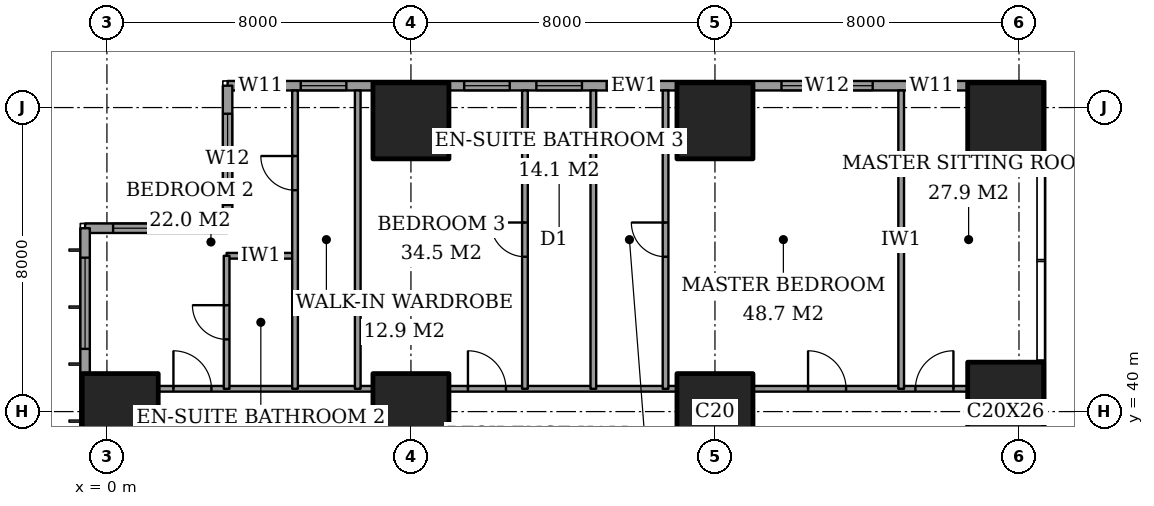
"""IFC4 building model, lengths in metres.
Left out: names, types, materials, properties, quantities, classifications, styles, units other than length and angle.
Written with IfcOpenShell. Run it as: python <this file> out.ifc"""

import sys

from ifc_helpers import new_model, si_unit, direction, frame, frame_2d, origin, origin_2d, place, context, subcontext, project, spatial, rectangle, extrude, element, fill, save


model = new_model("IFC4")
c1 = context("Model", 3, precision=1e-05, world=origin(), true_north=direction((0.0, 1.0)))
c2 = subcontext(c1, "Body", "Model", "MODEL_VIEW")
j1 = project(units=[si_unit("LENGTHUNIT", "METRE"), si_unit("PLANEANGLEUNIT", "RADIAN")], contexts=[c1])
p1 = place(None, origin())
s1 = spatial("IfcSite", under=j1, at=p1, CompositionType="ELEMENT")
p2 = place(p1, origin())
s2 = spatial("IfcBuilding", under=s1, at=p2, CompositionType="ELEMENT")
p3 = place(p2, frame((0.0, 0.0, 117.8)))
s3 = spatial("IfcBuildingStorey", under=s2, at=p3, CompositionType="ELEMENT", Elevation=117.8)
for number, where, z_axis, x_axis in (
    (1, (0.35, 40.0, 0.0), (0.0, 0.0, 1.0), (1.0, 0.0, 0.0)),
    (2, (8.0, 40.0, 0.0), (0.0, 0.0, 1.0), (1.0, 0.0, 0.0)),
    (3, (8.0, 47.65, 0.0), (0.0, 0.0, 1.0), (1.0, 0.0, 0.0)),
    (4, (16.0, 40.0, 0.0), (0.0, 0.0, 1.0), (1.0, 0.0, 0.0)),
    (5, (16.0, 47.65, 0.0), (0.0, 0.0, 1.0), (1.0, 0.0, 0.0)),
):
    element("IfcColumn", number, at=place(p3, frame(where, z_axis=z_axis, x_axis=x_axis)), inside=s3, PredefinedType="COLUMN", context=c2, shape_type="SweptSolid", body=[
        extrude(rectangle(XDim=2.0, YDim=2.0, at=origin_2d()), origin(), (0.0, 0.0, 1.0), 3.6),
    ])
p4 = place(p3, frame((23.65, 40.0, 0.0), z_axis=(0.0, 0.0, 1.0), x_axis=(1.0, 0.0, 0.0)))
e6 = element("IfcColumn", 6, at=p4, inside=s3, PredefinedType="COLUMN", context=c2, shape_type="SweptSolid", body=[
    extrude(rectangle(XDim=2.0, YDim=2.6, at=origin_2d()), origin(), (0.0, 0.0, 1.0), 3.6),
])
p5 = place(p3, frame((23.65, 47.65, 0.0), z_axis=(0.0, 0.0, 1.0), x_axis=(1.0, 0.0, 0.0)))
e7 = element("IfcColumn", 7, at=p5, inside=s3, PredefinedType="COLUMN", context=c2, shape_type="SweptSolid", body=[
    extrude(rectangle(XDim=2.0, YDim=2.0, at=origin_2d()), origin(), (0.0, 0.0, 1.0), 3.6),
])
p6 = place(p3, frame((24.575, 48.575, 0.0), z_axis=(0.0, 0.0, 1.0), x_axis=(-1.0, 0.0, 0.0)))
e8 = element("IfcWall", 8, at=p6, inside=s3, PredefinedType="SOLIDWALL", context=c2, shape_type="SweptSolid", body=[
    extrude(rectangle(XDim=21.4, YDim=0.25, at=frame_2d((10.7, 0.0))), origin(), (0.0, 0.0, 1.0), 3.6),
])
p7 = place(p6, frame((2.275, 0.0, 0.4)))
e9 = element("IfcOpeningElement", 9, at=p7, cuts=e8, PredefinedType="OPENING", context=c2, shape_type="SweptSolid", body=[
    extrude(rectangle(XDim=1.2, YDim=2.2, at=frame_2d((0.6, 1.1))), frame((0.0, 0.135, 0.0), z_axis=(0.0, -1.0, 0.0), x_axis=(1.0, 0.0, 0.0)), (0.0, 0.0, 1.0), 0.27),
])
p8 = place(p6, frame((4.425, 0.0, 0.4)))
e10 = element("IfcOpeningElement", 10, at=p8, cuts=e8, PredefinedType="OPENING", context=c2, shape_type="SweptSolid", body=[
    extrude(rectangle(XDim=2.4, YDim=2.2, at=frame_2d((1.2, 1.1))), frame((0.0, 0.135, 0.0), z_axis=(0.0, -1.0, 0.0), x_axis=(1.0, 0.0, 0.0)), (0.0, 0.0, 1.0), 0.27),
])
p9 = place(p6, frame((10.225, 0.0, 0.4)))
e11 = element("IfcOpeningElement", 11, at=p9, cuts=e8, PredefinedType="OPENING", context=c2, shape_type="SweptSolid", body=[
    extrude(rectangle(XDim=1.2, YDim=2.2, at=frame_2d((0.6, 1.1))), frame((0.0, 0.135, 0.0), z_axis=(0.0, -1.0, 0.0), x_axis=(1.0, 0.0, 0.0)), (0.0, 0.0, 1.0), 0.27),
])
p10 = place(p6, frame((12.075, 0.0, 0.4)))
e12 = element("IfcOpeningElement", 12, at=p10, cuts=e8, PredefinedType="OPENING", context=c2, shape_type="SweptSolid", body=[
    extrude(rectangle(XDim=1.2, YDim=2.2, at=frame_2d((0.6, 1.1))), frame((0.0, 0.135, 0.0), z_axis=(0.0, -1.0, 0.0), x_axis=(1.0, 0.0, 0.0)), (0.0, 0.0, 1.0), 0.27),
])
p11 = place(p6, frame((13.975, 0.0, 0.4)))
e13 = element("IfcOpeningElement", 13, at=p11, cuts=e8, PredefinedType="OPENING", context=c2, shape_type="SweptSolid", body=[
    extrude(rectangle(XDim=1.2, YDim=2.2, at=frame_2d((0.6, 1.1))), frame((0.0, 0.135, 0.0), z_axis=(0.0, -1.0, 0.0), x_axis=(1.0, 0.0, 0.0)), (0.0, 0.0, 1.0), 0.27),
])
p12 = place(p6, frame((18.275, 0.0, 0.4)))
e14 = element("IfcOpeningElement", 14, at=p12, cuts=e8, PredefinedType="OPENING", context=c2, shape_type="SweptSolid", body=[
    extrude(rectangle(XDim=1.2, YDim=2.2, at=frame_2d((0.6, 1.1))), frame((0.0, 0.135, 0.0), z_axis=(0.0, -1.0, 0.0), x_axis=(1.0, 0.0, 0.0)), (0.0, 0.0, 1.0), 0.27),
])
p13 = place(p6, frame((19.925, 0.0, 0.4)))
e15 = element("IfcOpeningElement", 15, at=p13, cuts=e8, PredefinedType="OPENING", context=c2, shape_type="SweptSolid", body=[
    extrude(rectangle(XDim=1.2, YDim=2.2, at=frame_2d((0.6, 1.1))), frame((0.0, 0.135, 0.0), z_axis=(0.0, -1.0, 0.0), x_axis=(1.0, 0.0, 0.0)), (0.0, 0.0, 1.0), 0.27),
])
p14 = place(p3, frame((3.175, 48.575, 0.0), z_axis=(0.0, 0.0, 1.0), x_axis=(0.0, -1.0, 0.0)))
e16 = element("IfcWall", 16, at=p14, inside=s3, PredefinedType="SOLIDWALL", context=c2, shape_type="SweptSolid", body=[
    extrude(rectangle(XDim=3.75, YDim=0.25, at=frame_2d((1.875, 0.0))), origin(), (0.0, 0.0, 1.0), 3.6),
])
p15 = place(p14, frame((0.738, 0.0, 0.4)))
e17 = element("IfcOpeningElement", 17, at=p15, cuts=e16, PredefinedType="OPENING", context=c2, shape_type="SweptSolid", body=[
    extrude(rectangle(XDim=2.4, YDim=2.2, at=frame_2d((1.2, 1.1))), frame((0.0, 0.135, 0.0), z_axis=(0.0, -1.0, 0.0), x_axis=(1.0, 0.0, 0.0)), (0.0, 0.0, 1.0), 0.27),
])
p16 = place(p3, frame((3.175, 44.825, 0.0), z_axis=(0.0, 0.0, 1.0), x_axis=(-1.0, 0.0, 0.0)))
e18 = element("IfcWall", 18, at=p16, inside=s3, PredefinedType="SOLIDWALL", context=c2, shape_type="SweptSolid", body=[
    extrude(rectangle(XDim=3.75, YDim=0.25, at=frame_2d((1.875, 0.0))), origin(), (0.0, 0.0, 1.0), 3.6),
])
p17 = place(p16, frame((0.613, 0.0, 0.4)))
e19 = element("IfcOpeningElement", 19, at=p17, cuts=e18, PredefinedType="OPENING", context=c2, shape_type="SweptSolid", body=[
    extrude(rectangle(XDim=2.4, YDim=2.2, at=frame_2d((1.2, 1.1))), frame((0.0, 0.135, 0.0), z_axis=(0.0, -1.0, 0.0), x_axis=(1.0, 0.0, 0.0)), (0.0, 0.0, 1.0), 0.27),
])
p18 = place(p3, frame((-0.575, 44.825, 0.0), z_axis=(0.0, 0.0, 1.0), x_axis=(0.0, -1.0, 0.0)))
e20 = element("IfcWall", 20, at=p18, inside=s3, PredefinedType="SOLIDWALL", context=c2, shape_type="SweptSolid", body=[
    extrude(rectangle(XDim=41.65, YDim=0.25, at=frame_2d((20.825, 0.0))), origin(), (0.0, 0.0, 1.0), 3.6),
])
p19 = place(p18, frame((0.775, 0.0, 0.4)))
e21 = element("IfcOpeningElement", 21, at=p19, cuts=e20, PredefinedType="OPENING", context=c2, shape_type="SweptSolid", body=[
    extrude(rectangle(XDim=2.4, YDim=2.2, at=frame_2d((1.2, 1.1))), frame((0.0, 0.135, 0.0), z_axis=(0.0, -1.0, 0.0), x_axis=(1.0, 0.0, 0.0)), (0.0, 0.0, 1.0), 0.27),
])
p20 = place(p18, frame((6.1, 0.0, 0.4)))
e22 = element("IfcOpeningElement", 22, at=p20, cuts=e20, PredefinedType="OPENING", context=c2, shape_type="SweptSolid", body=[
    extrude(rectangle(XDim=1.2, YDim=2.2, at=frame_2d((0.6, 1.1))), frame((0.0, 0.135, 0.0), z_axis=(0.0, -1.0, 0.0), x_axis=(1.0, 0.0, 0.0)), (0.0, 0.0, 1.0), 0.27),
])
p21 = place(p18, frame((8.225, 0.0, 0.4)))
e23 = element("IfcOpeningElement", 23, at=p21, cuts=e20, PredefinedType="OPENING", context=c2, shape_type="SweptSolid", body=[
    extrude(rectangle(XDim=2.4, YDim=2.2, at=frame_2d((1.2, 1.1))), frame((0.0, 0.135, 0.0), z_axis=(0.0, -1.0, 0.0), x_axis=(1.0, 0.0, 0.0)), (0.0, 0.0, 1.0), 0.27),
])
p22 = place(p18, frame((15.625, 0.0, 0.4)))
e24 = element("IfcOpeningElement", 24, at=p22, cuts=e20, PredefinedType="OPENING", context=c2, shape_type="SweptSolid", body=[
    extrude(rectangle(XDim=2.4, YDim=2.2, at=frame_2d((1.2, 1.1))), frame((0.0, 0.135, 0.0), z_axis=(0.0, -1.0, 0.0), x_axis=(1.0, 0.0, 0.0)), (0.0, 0.0, 1.0), 0.27),
])
p23 = place(p18, frame((23.625, 0.0, 0.4)))
e25 = element("IfcOpeningElement", 25, at=p23, cuts=e20, PredefinedType="OPENING", context=c2, shape_type="SweptSolid", body=[
    extrude(rectangle(XDim=2.4, YDim=2.2, at=frame_2d((1.2, 1.1))), frame((0.0, 0.135, 0.0), z_axis=(0.0, -1.0, 0.0), x_axis=(1.0, 0.0, 0.0)), (0.0, 0.0, 1.0), 0.27),
])
p24 = place(p18, frame((30.825, 0.0, 0.4)))
e26 = element("IfcOpeningElement", 26, at=p24, cuts=e20, PredefinedType="OPENING", context=c2, shape_type="SweptSolid", body=[
    extrude(rectangle(XDim=2.4, YDim=2.2, at=frame_2d((1.2, 1.1))), frame((0.0, 0.135, 0.0), z_axis=(0.0, -1.0, 0.0), x_axis=(1.0, 0.0, 0.0)), (0.0, 0.0, 1.0), 0.27),
])
p25 = place(p18, frame((34.5, 0.0, 0.4)))
e27 = element("IfcOpeningElement", 27, at=p25, cuts=e20, PredefinedType="OPENING", context=c2, shape_type="SweptSolid", body=[
    extrude(rectangle(XDim=1.2, YDim=2.2, at=frame_2d((0.6, 1.1))), frame((0.0, 0.135, 0.0), z_axis=(0.0, -1.0, 0.0), x_axis=(1.0, 0.0, 0.0)), (0.0, 0.0, 1.0), 0.27),
])
p26 = place(p18, frame((38.475, 0.0, 0.4)))
e28 = element("IfcOpeningElement", 28, at=p26, cuts=e20, PredefinedType="OPENING", context=c2, shape_type="SweptSolid", body=[
    extrude(rectangle(XDim=2.4, YDim=2.2, at=frame_2d((1.2, 1.1))), frame((0.0, 0.135, 0.0), z_axis=(0.0, -1.0, 0.0), x_axis=(1.0, 0.0, 0.0)), (0.0, 0.0, 1.0), 0.27),
])
p27 = place(p3, frame((1.35, 40.6, 0.0), z_axis=(0.0, 0.0, 1.0), x_axis=(1.0, 0.0, 0.0)))
e29 = element("IfcWall", 29, at=p27, inside=s3, PredefinedType="PARTITIONING", context=c2, shape_type="SweptSolid", body=[
    extrude(rectangle(XDim=5.65, YDim=0.15, at=frame_2d((2.825, 0.0))), origin(), (0.0, 0.0, 1.0), 3.35),
])
p28 = place(p27, frame((0.4, 0.0, 0.0)))
e30 = element("IfcOpeningElement", 30, at=p28, cuts=e29, PredefinedType="OPENING", context=c2, shape_type="SweptSolid", body=[
    extrude(rectangle(XDim=1.0, YDim=2.1, at=frame_2d((0.5, 1.05))), frame((0.0, 0.085, 0.0), z_axis=(0.0, -1.0, 0.0), x_axis=(1.0, 0.0, 0.0)), (0.0, 0.0, 1.0), 0.17),
])
p29 = place(p3, frame((9.0, 40.6, 0.0), z_axis=(0.0, 0.0, 1.0), x_axis=(1.0, 0.0, 0.0)))
e31 = element("IfcWall", 31, at=p29, inside=s3, PredefinedType="PARTITIONING", context=c2, shape_type="SweptSolid", body=[
    extrude(rectangle(XDim=6.0, YDim=0.15, at=frame_2d((3.0, 0.0))), origin(), (0.0, 0.0, 1.0), 3.35),
])
p30 = place(p29, frame((0.5, 0.0, 0.0)))
e32 = element("IfcOpeningElement", 32, at=p30, cuts=e31, PredefinedType="OPENING", context=c2, shape_type="SweptSolid", body=[
    extrude(rectangle(XDim=1.0, YDim=2.1, at=frame_2d((0.5, 1.05))), frame((0.0, 0.085, 0.0), z_axis=(0.0, -1.0, 0.0), x_axis=(1.0, 0.0, 0.0)), (0.0, 0.0, 1.0), 0.17),
])
p31 = place(p3, frame((17.0, 40.6, 0.0), z_axis=(0.0, 0.0, 1.0), x_axis=(1.0, 0.0, 0.0)))
e33 = element("IfcWall", 33, at=p31, inside=s3, PredefinedType="PARTITIONING", context=c2, shape_type="SweptSolid", body=[
    extrude(rectangle(XDim=5.65, YDim=0.15, at=frame_2d((2.825, 0.0))), origin(), (0.0, 0.0, 1.0), 3.35),
])
p32 = place(p31, frame((1.45, 0.0, 0.0)))
e34 = element("IfcOpeningElement", 34, at=p32, cuts=e33, PredefinedType="OPENING", context=c2, shape_type="SweptSolid", body=[
    extrude(rectangle(XDim=1.0, YDim=2.1, at=frame_2d((0.5, 1.05))), frame((0.0, 0.085, 0.0), z_axis=(0.0, -1.0, 0.0), x_axis=(1.0, 0.0, 0.0)), (0.0, 0.0, 1.0), 0.17),
])
p33 = place(p31, frame((4.275, 0.0, 0.0)))
e35 = element("IfcOpeningElement", 35, at=p33, cuts=e33, PredefinedType="OPENING", context=c2, shape_type="SweptSolid", body=[
    extrude(rectangle(XDim=1.0, YDim=2.1, at=frame_2d((0.5, 1.05))), frame((0.0, 0.085, 0.0), z_axis=(0.0, -1.0, 0.0), x_axis=(1.0, 0.0, 0.0)), (0.0, 0.0, 1.0), 0.17),
])
p34 = place(p3, frame((3.15, 44.1, 0.0), z_axis=(0.0, 0.0, 1.0), x_axis=(1.0, 0.0, 0.0)))
e36 = element("IfcWall", 36, at=p34, inside=s3, PredefinedType="PARTITIONING", context=c2, shape_type="SweptSolid", body=[
    extrude(rectangle(XDim=1.8, YDim=0.15, at=frame_2d((0.9, 0.0))), origin(), (0.0, 0.0, 1.0), 3.35),
])
p35 = place(p3, frame((3.15, 40.6, 0.0), z_axis=(0.0, 0.0, 1.0), x_axis=(0.0, 1.0, 0.0)))
e37 = element("IfcWall", 37, at=p35, inside=s3, PredefinedType="PARTITIONING", context=c2, shape_type="SweptSolid", body=[
    extrude(rectangle(XDim=3.5, YDim=0.15, at=frame_2d((1.75, 0.0))), origin(), (0.0, 0.0, 1.0), 3.35),
])
p36 = place(p35, frame((1.3, 0.0, 0.0)))
e38 = element("IfcOpeningElement", 38, at=p36, cuts=e37, PredefinedType="OPENING", context=c2, shape_type="SweptSolid", body=[
    extrude(rectangle(XDim=0.9, YDim=2.1, at=frame_2d((0.45, 1.05))), frame((0.0, 0.085, 0.0), z_axis=(0.0, -1.0, 0.0), x_axis=(1.0, 0.0, 0.0)), (0.0, 0.0, 1.0), 0.17),
])
p37 = place(p3, frame((4.95, 40.6, 0.0), z_axis=(0.0, 0.0, 1.0), x_axis=(0.0, 1.0, 0.0)))
e39 = element("IfcWall", 39, at=p37, inside=s3, PredefinedType="PARTITIONING", context=c2, shape_type="SweptSolid", body=[
    extrude(rectangle(XDim=7.85, YDim=0.15, at=frame_2d((3.925, 0.0))), origin(), (0.0, 0.0, 1.0), 3.35),
])
p38 = place(p37, frame((5.225, 0.0, 0.0)))
e40 = element("IfcOpeningElement", 40, at=p38, cuts=e39, PredefinedType="OPENING", context=c2, shape_type="SweptSolid", body=[
    extrude(rectangle(XDim=0.9, YDim=2.1, at=frame_2d((0.45, 1.05))), frame((0.0, 0.085, 0.0), z_axis=(0.0, -1.0, 0.0), x_axis=(1.0, 0.0, 0.0)), (0.0, 0.0, 1.0), 0.17),
])
p39 = place(p3, frame((6.6, 40.6, 0.0), z_axis=(0.0, 0.0, 1.0), x_axis=(0.0, 1.0, 0.0)))
e41 = element("IfcWall", 41, at=p39, inside=s3, PredefinedType="PARTITIONING", context=c2, shape_type="SweptSolid", body=[
    extrude(rectangle(XDim=7.85, YDim=0.15, at=frame_2d((3.925, 0.0))), origin(), (0.0, 0.0, 1.0), 3.35),
])
p40 = place(p3, frame((11.0, 40.6, 0.0), z_axis=(0.0, 0.0, 1.0), x_axis=(0.0, 1.0, 0.0)))
e42 = element("IfcWall", 42, at=p40, inside=s3, PredefinedType="PARTITIONING", context=c2, shape_type="SweptSolid", body=[
    extrude(rectangle(XDim=7.85, YDim=0.15, at=frame_2d((3.925, 0.0))), origin(), (0.0, 0.0, 1.0), 3.35),
])
p41 = place(p40, frame((3.475, 0.0, 0.0)))
e43 = element("IfcOpeningElement", 43, at=p41, cuts=e42, PredefinedType="OPENING", context=c2, shape_type="SweptSolid", body=[
    extrude(rectangle(XDim=0.9, YDim=2.1, at=frame_2d((0.45, 1.05))), frame((0.0, 0.085, 0.0), z_axis=(0.0, -1.0, 0.0), x_axis=(1.0, 0.0, 0.0)), (0.0, 0.0, 1.0), 0.17),
])
p42 = place(p3, frame((12.8, 40.6, 0.0), z_axis=(0.0, 0.0, 1.0), x_axis=(0.0, 1.0, 0.0)))
e44 = element("IfcWall", 44, at=p42, inside=s3, PredefinedType="PARTITIONING", context=c2, shape_type="SweptSolid", body=[
    extrude(rectangle(XDim=7.85, YDim=0.15, at=frame_2d((3.925, 0.0))), origin(), (0.0, 0.0, 1.0), 3.35),
])
p43 = place(p3, frame((14.7, 40.6, 0.0), z_axis=(0.0, 0.0, 1.0), x_axis=(0.0, 1.0, 0.0)))
e45 = element("IfcWall", 45, at=p43, inside=s3, PredefinedType="PARTITIONING", context=c2, shape_type="SweptSolid", body=[
    extrude(rectangle(XDim=7.85, YDim=0.15, at=frame_2d((3.925, 0.0))), origin(), (0.0, 0.0, 1.0), 3.35),
])
p44 = place(p43, frame((3.475, 0.0, 0.0)))
e46 = element("IfcOpeningElement", 46, at=p44, cuts=e45, PredefinedType="OPENING", context=c2, shape_type="SweptSolid", body=[
    extrude(rectangle(XDim=0.9, YDim=2.1, at=frame_2d((0.45, 1.05))), frame((0.0, 0.085, 0.0), z_axis=(0.0, -1.0, 0.0), x_axis=(1.0, 0.0, 0.0)), (0.0, 0.0, 1.0), 0.17),
])
p45 = place(p3, frame((20.9, 40.6, 0.0), z_axis=(0.0, 0.0, 1.0), x_axis=(0.0, 1.0, 0.0)))
e47 = element("IfcWall", 47, at=p45, inside=s3, PredefinedType="PARTITIONING", context=c2, shape_type="SweptSolid", body=[
    extrude(rectangle(XDim=7.85, YDim=0.15, at=frame_2d((3.925, 0.0))), origin(), (0.0, 0.0, 1.0), 3.35),
])
p46 = place(p7, origin())
e48 = element("IfcWindow", 48, at=p46, inside=s3, PartitioningType="SINGLE_PANEL", PredefinedType="WINDOW", context=c2, shape_type="SweptSolid", body=[
    extrude(rectangle(XDim=1.2, YDim=2.2, at=frame_2d((0.6, 1.1))), frame((0.0, 0.03, 0.0), z_axis=(0.0, -1.0, 0.0), x_axis=(1.0, 0.0, 0.0)), (0.0, 0.0, 1.0), 0.06),
])
fill(e9, e48)
p47 = place(p8, origin())
e49 = element("IfcWindow", 49, at=p47, inside=s3, PartitioningType="SINGLE_PANEL", PredefinedType="WINDOW", context=c2, shape_type="SweptSolid", body=[
    extrude(rectangle(XDim=2.4, YDim=2.2, at=frame_2d((1.2, 1.1))), frame((0.0, 0.03, 0.0), z_axis=(0.0, -1.0, 0.0), x_axis=(1.0, 0.0, 0.0)), (0.0, 0.0, 1.0), 0.06),
])
fill(e10, e49)
p48 = place(p9, origin())
e50 = element("IfcWindow", 50, at=p48, inside=s3, PartitioningType="SINGLE_PANEL", PredefinedType="WINDOW", context=c2, shape_type="SweptSolid", body=[
    extrude(rectangle(XDim=1.2, YDim=2.2, at=frame_2d((0.6, 1.1))), frame((0.0, 0.03, 0.0), z_axis=(0.0, -1.0, 0.0), x_axis=(1.0, 0.0, 0.0)), (0.0, 0.0, 1.0), 0.06),
])
fill(e11, e50)
p49 = place(p10, origin())
e51 = element("IfcWindow", 51, at=p49, inside=s3, PartitioningType="SINGLE_PANEL", PredefinedType="WINDOW", context=c2, shape_type="SweptSolid", body=[
    extrude(rectangle(XDim=1.2, YDim=2.2, at=frame_2d((0.6, 1.1))), frame((0.0, 0.03, 0.0), z_axis=(0.0, -1.0, 0.0), x_axis=(1.0, 0.0, 0.0)), (0.0, 0.0, 1.0), 0.06),
])
fill(e12, e51)
p50 = place(p11, origin())
e52 = element("IfcWindow", 52, at=p50, inside=s3, PartitioningType="SINGLE_PANEL", PredefinedType="WINDOW", context=c2, shape_type="SweptSolid", body=[
    extrude(rectangle(XDim=1.2, YDim=2.2, at=frame_2d((0.6, 1.1))), frame((0.0, 0.03, 0.0), z_axis=(0.0, -1.0, 0.0), x_axis=(1.0, 0.0, 0.0)), (0.0, 0.0, 1.0), 0.06),
])
fill(e13, e52)
p51 = place(p12, origin())
e53 = element("IfcWindow", 53, at=p51, inside=s3, PartitioningType="SINGLE_PANEL", PredefinedType="WINDOW", context=c2, shape_type="SweptSolid", body=[
    extrude(rectangle(XDim=1.2, YDim=2.2, at=frame_2d((0.6, 1.1))), frame((0.0, 0.03, 0.0), z_axis=(0.0, -1.0, 0.0), x_axis=(1.0, 0.0, 0.0)), (0.0, 0.0, 1.0), 0.06),
])
fill(e14, e53)
p52 = place(p13, origin())
e54 = element("IfcWindow", 54, at=p52, inside=s3, PartitioningType="SINGLE_PANEL", PredefinedType="WINDOW", context=c2, shape_type="SweptSolid", body=[
    extrude(rectangle(XDim=1.2, YDim=2.2, at=frame_2d((0.6, 1.1))), frame((0.0, 0.03, 0.0), z_axis=(0.0, -1.0, 0.0), x_axis=(1.0, 0.0, 0.0)), (0.0, 0.0, 1.0), 0.06),
])
fill(e15, e54)
p53 = place(p15, origin())
e55 = element("IfcWindow", 55, at=p53, inside=s3, PartitioningType="SINGLE_PANEL", PredefinedType="WINDOW", context=c2, shape_type="SweptSolid", body=[
    extrude(rectangle(XDim=2.4, YDim=2.2, at=frame_2d((1.2, 1.1))), frame((0.0, 0.03, 0.0), z_axis=(0.0, -1.0, 0.0), x_axis=(1.0, 0.0, 0.0)), (0.0, 0.0, 1.0), 0.06),
])
fill(e17, e55)
p54 = place(p17, origin())
e56 = element("IfcWindow", 56, at=p54, inside=s3, PartitioningType="SINGLE_PANEL", PredefinedType="WINDOW", context=c2, shape_type="SweptSolid", body=[
    extrude(rectangle(XDim=2.4, YDim=2.2, at=frame_2d((1.2, 1.1))), frame((0.0, 0.03, 0.0), z_axis=(0.0, -1.0, 0.0), x_axis=(1.0, 0.0, 0.0)), (0.0, 0.0, 1.0), 0.06),
])
fill(e19, e56)
p55 = place(p19, origin())
e57 = element("IfcWindow", 57, at=p55, inside=s3, PartitioningType="SINGLE_PANEL", PredefinedType="WINDOW", context=c2, shape_type="SweptSolid", body=[
    extrude(rectangle(XDim=2.4, YDim=2.2, at=frame_2d((1.2, 1.1))), frame((0.0, 0.03, 0.0), z_axis=(0.0, -1.0, 0.0), x_axis=(1.0, 0.0, 0.0)), (0.0, 0.0, 1.0), 0.06),
])
fill(e21, e57)
p56 = place(p36, origin())
e58 = element("IfcDoor", 58, at=p56, inside=s3, OperationType="SINGLE_SWING_LEFT", PredefinedType="DOOR", context=c2, shape_type="SweptSolid", body=[
    extrude(rectangle(XDim=0.9, YDim=2.1, at=frame_2d((0.45, 1.05))), frame((0.0, 0.025, 0.0), z_axis=(0.0, -1.0, 0.0), x_axis=(1.0, 0.0, 0.0)), (0.0, 0.0, 1.0), 0.05),
])
fill(e38, e58)
p57 = place(p28, origin())
e59 = element("IfcDoor", 59, at=p57, inside=s3, OperationType="SINGLE_SWING_RIGHT", PredefinedType="DOOR", context=c2, shape_type="SweptSolid", body=[
    extrude(rectangle(XDim=1.0, YDim=2.1, at=frame_2d((0.5, 1.05))), frame((0.0, 0.025, 0.0), z_axis=(0.0, -1.0, 0.0), x_axis=(1.0, 0.0, 0.0)), (0.0, 0.0, 1.0), 0.05),
])
fill(e30, e59)
p58 = place(p38, origin())
e60 = element("IfcDoor", 60, at=p58, inside=s3, OperationType="SINGLE_SWING_LEFT", PredefinedType="DOOR", context=c2, shape_type="SweptSolid", body=[
    extrude(rectangle(XDim=0.9, YDim=2.1, at=frame_2d((0.45, 1.05))), frame((0.0, 0.025, 0.0), z_axis=(0.0, -1.0, 0.0), x_axis=(1.0, 0.0, 0.0)), (0.0, 0.0, 1.0), 0.05),
])
fill(e40, e60)
p59 = place(p30, origin())
e61 = element("IfcDoor", 61, at=p59, inside=s3, OperationType="SINGLE_SWING_RIGHT", PredefinedType="DOOR", context=c2, shape_type="SweptSolid", body=[
    extrude(rectangle(XDim=1.0, YDim=2.1, at=frame_2d((0.5, 1.05))), frame((0.0, 0.025, 0.0), z_axis=(0.0, -1.0, 0.0), x_axis=(1.0, 0.0, 0.0)), (0.0, 0.0, 1.0), 0.05),
])
fill(e32, e61)
p60 = place(p41, origin())
e62 = element("IfcDoor", 62, at=p60, inside=s3, OperationType="SINGLE_SWING_LEFT", PredefinedType="DOOR", context=c2, shape_type="SweptSolid", body=[
    extrude(rectangle(XDim=0.9, YDim=2.1, at=frame_2d((0.45, 1.05))), frame((0.0, 0.025, 0.0), z_axis=(0.0, -1.0, 0.0), x_axis=(1.0, 0.0, 0.0)), (0.0, 0.0, 1.0), 0.05),
])
fill(e43, e62)
p61 = place(p44, origin())
e63 = element("IfcDoor", 63, at=p61, inside=s3, OperationType="SINGLE_SWING_LEFT", PredefinedType="DOOR", context=c2, shape_type="SweptSolid", body=[
    extrude(rectangle(XDim=0.9, YDim=2.1, at=frame_2d((0.45, 1.05))), frame((0.0, 0.025, 0.0), z_axis=(0.0, -1.0, 0.0), x_axis=(1.0, 0.0, 0.0)), (0.0, 0.0, 1.0), 0.05),
])
fill(e46, e63)
p62 = place(p32, origin())
e64 = element("IfcDoor", 64, at=p62, inside=s3, OperationType="SINGLE_SWING_RIGHT", PredefinedType="DOOR", context=c2, shape_type="SweptSolid", body=[
    extrude(rectangle(XDim=1.0, YDim=2.1, at=frame_2d((0.5, 1.05))), frame((0.0, 0.025, 0.0), z_axis=(0.0, -1.0, 0.0), x_axis=(1.0, 0.0, 0.0)), (0.0, 0.0, 1.0), 0.05),
])
fill(e34, e64)
p63 = place(p33, origin())
e65 = element("IfcDoor", 65, at=p63, inside=s3, OperationType="SINGLE_SWING_LEFT", PredefinedType="DOOR", context=c2, shape_type="SweptSolid", body=[
    extrude(rectangle(XDim=1.0, YDim=2.1, at=frame_2d((0.5, 1.05))), frame((0.0, 0.025, 0.0), z_axis=(0.0, -1.0, 0.0), x_axis=(1.0, 0.0, 0.0)), (0.0, 0.0, 1.0), 0.05),
])
fill(e35, e65)
save(model, sys.argv[1])
